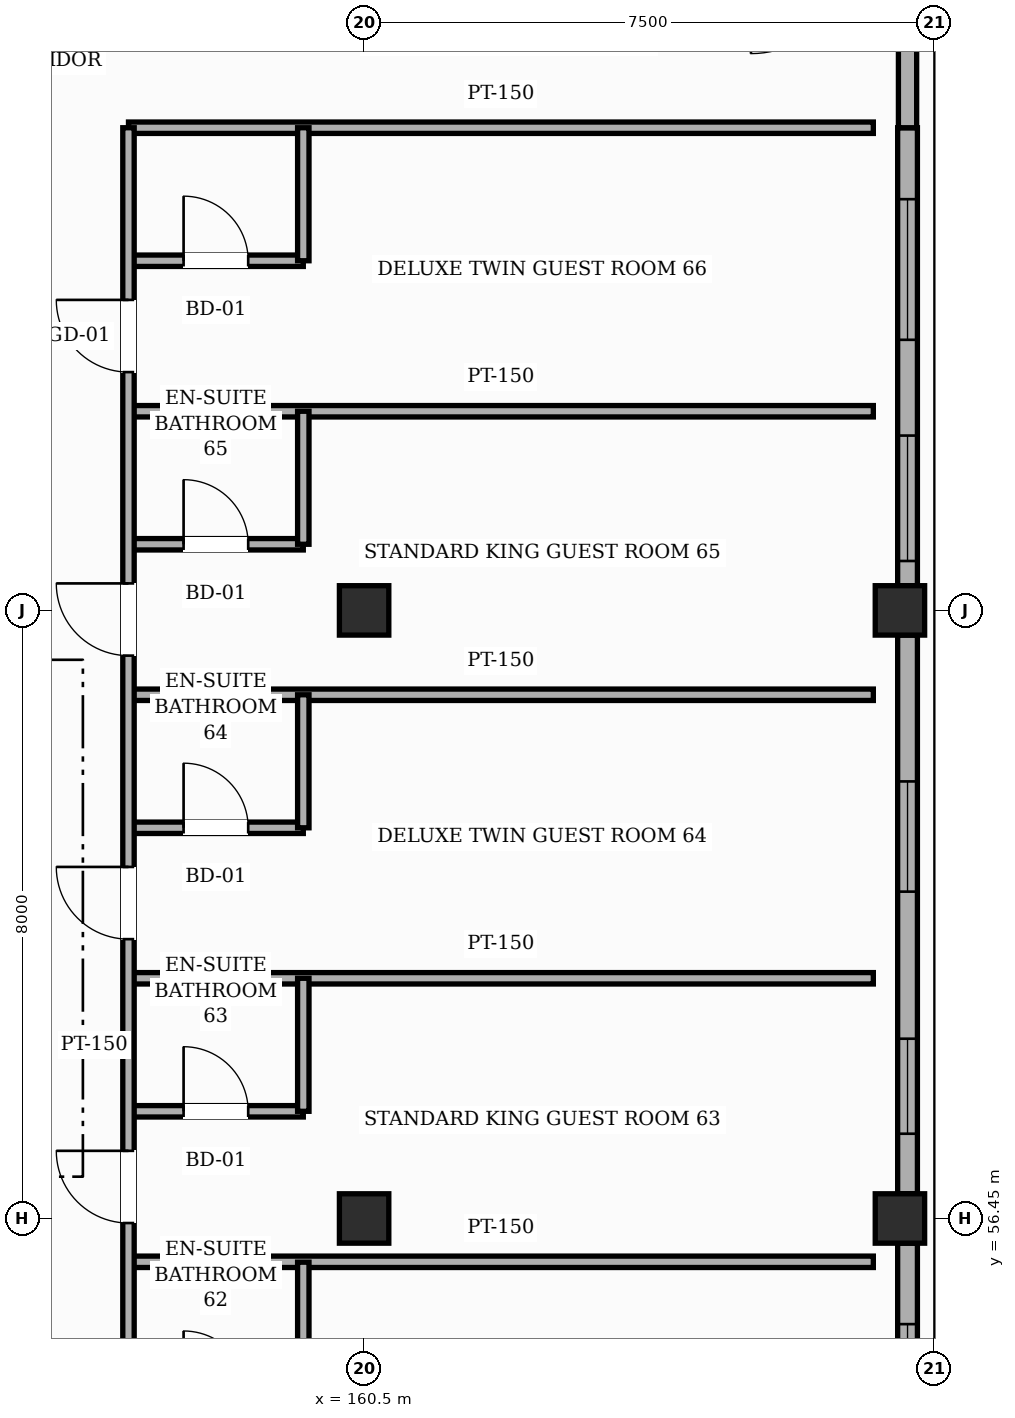
"""IFC4 building model, lengths in metres.
Left out: names, types, materials, properties, quantities, classifications, styles, units other than length and angle.
Written with IfcOpenShell. Run it as: python <this file> out.ifc"""

import sys

from ifc_helpers import new_model, si_unit, direction, frame, frame_2d, origin, origin_2d, place, context, subcontext, project, spatial, rectangle, hollow_rectangle, extrude, element, fill, save


model = new_model("IFC4")
c1 = context("Model", 3, precision=1e-05, world=origin(), true_north=direction((0.0, 1.0)))
c2 = subcontext(c1, "Body", "Model", "MODEL_VIEW")
j1 = project(units=[si_unit("LENGTHUNIT", "METRE"), si_unit("PLANEANGLEUNIT", "RADIAN")], contexts=[c1])
p1 = place(None, origin())
s1 = spatial("IfcSite", under=j1, at=p1, CompositionType="ELEMENT")
p2 = place(p1, origin())
s2 = spatial("IfcBuilding", under=s1, at=p2, CompositionType="ELEMENT")
p3 = place(p2, frame((0.0, 0.0, 19.8)))
s3 = spatial("IfcBuildingStorey", under=s2, at=p3, CompositionType="ELEMENT", Elevation=19.8)
for number, where, z_axis, x_axis in (
    (1, (160.5, 56.45, 0.0), (0.0, 0.0, 1.0), (1.0, 0.0, 0.0)),
    (2, (160.5, 64.45, 0.0), (0.0, 0.0, 1.0), (1.0, 0.0, 0.0)),
    (3, (167.55, 56.45, 0.0), (0.0, 0.0, 1.0), (1.0, 0.0, 0.0)),
    (4, (167.55, 64.45, 0.0), (0.0, 0.0, 1.0), (1.0, 0.0, 0.0)),
):
    element("IfcColumn", number, at=place(p3, frame(where, z_axis=z_axis, x_axis=x_axis)), inside=s3, PredefinedType="COLUMN", context=c2, shape_type="SweptSolid", body=[
        extrude(hollow_rectangle(XDim=0.65, YDim=0.65, WallThickness=0.025, InnerFilletRadius=0.025, OuterFilletRadius=0.05, at=origin_2d()), origin(), (0.0, 0.0, 1.0), 4.8),
    ])
p4 = place(p3, frame((167.65, 56.125, 0.0), z_axis=(0.0, 0.0, 1.0), x_axis=(0.0, -1.0, 0.0)))
e5 = element("IfcWall", 5, at=p4, inside=s3, PredefinedType="SOLIDWALL", context=c2, shape_type="SweptSolid", body=[
    extrude(rectangle(XDim=7.35, YDim=0.26, at=frame_2d((3.675, 0.0))), origin(), (0.0, 0.0, 1.0), 3.905),
])
p5 = place(p4, frame((4.74, 0.0, 0.85)))
e6 = element("IfcOpeningElement", 6, at=p5, cuts=e5, PredefinedType="OPENING", context=c2, shape_type="SweptSolid", body=[
    extrude(rectangle(XDim=1.85, YDim=1.95, at=frame_2d((0.925, 0.975))), frame((0.0, 0.14, 0.0), z_axis=(0.0, -1.0, 0.0), x_axis=(1.0, 0.0, 0.0)), (0.0, 0.0, 1.0), 0.28),
])
p6 = place(p4, frame((1.065, 0.0, 0.85)))
e7 = element("IfcOpeningElement", 7, at=p6, cuts=e5, PredefinedType="OPENING", context=c2, shape_type="SweptSolid", body=[
    extrude(rectangle(XDim=2.1, YDim=1.95, at=frame_2d((1.05, 0.975))), frame((0.0, 0.14, 0.0), z_axis=(0.0, -1.0, 0.0), x_axis=(1.0, 0.0, 0.0)), (0.0, 0.0, 1.0), 0.28),
])
p7 = place(p3, frame((167.65, 64.125, 0.0), z_axis=(0.0, 0.0, 1.0), x_axis=(0.0, -1.0, 0.0)))
e8 = element("IfcWall", 8, at=p7, inside=s3, PredefinedType="SOLIDWALL", context=c2, shape_type="SweptSolid", body=[
    extrude(rectangle(XDim=7.35, YDim=0.26, at=frame_2d((3.675, 0.0))), origin(), (0.0, 0.0, 1.0), 3.905),
])
p8 = place(p7, frame((5.31, 0.0, 0.85)))
e9 = element("IfcOpeningElement", 9, at=p8, cuts=e8, PredefinedType="OPENING", context=c2, shape_type="SweptSolid", body=[
    extrude(rectangle(XDim=1.25, YDim=1.35, at=frame_2d((0.625, 0.675))), frame((0.0, 0.14, 0.0), z_axis=(0.0, -1.0, 0.0), x_axis=(1.0, 0.0, 0.0)), (0.0, 0.0, 1.0), 0.28),
])
p9 = place(p7, frame((1.925, 0.0, 0.85)))
e10 = element("IfcOpeningElement", 10, at=p9, cuts=e8, PredefinedType="OPENING", context=c2, shape_type="SweptSolid", body=[
    extrude(rectangle(XDim=1.45, YDim=1.35, at=frame_2d((0.725, 0.675))), frame((0.0, 0.14, 0.0), z_axis=(0.0, -1.0, 0.0), x_axis=(1.0, 0.0, 0.0)), (0.0, 0.0, 1.0), 0.28),
])
p10 = place(p3, frame((167.65, 70.8, 0.0), z_axis=(0.0, 0.0, 1.0), x_axis=(0.0, -1.0, 0.0)))
e11 = element("IfcWall", 11, at=p10, inside=s3, PredefinedType="SOLIDWALL", context=c2, shape_type="SweptSolid", body=[
    extrude(rectangle(XDim=6.025, YDim=0.26, at=frame_2d((3.013, 0.0))), origin(), (0.0, 0.0, 1.0), 4.565),
])
p11 = place(p10, frame((4.05, 0.0, 0.85)))
e12 = element("IfcOpeningElement", 12, at=p11, cuts=e11, PredefinedType="OPENING", context=c2, shape_type="SweptSolid", body=[
    extrude(rectangle(XDim=1.65, YDim=1.35, at=frame_2d((0.825, 0.675))), frame((0.0, 0.14, 0.0), z_axis=(0.0, -1.0, 0.0), x_axis=(1.0, 0.0, 0.0)), (0.0, 0.0, 1.0), 0.28),
])
p12 = place(p10, frame((0.94, 0.0, 0.85)))
e13 = element("IfcOpeningElement", 13, at=p12, cuts=e11, PredefinedType="OPENING", context=c2, shape_type="SweptSolid", body=[
    extrude(rectangle(XDim=1.85, YDim=1.35, at=frame_2d((0.925, 0.675))), frame((0.0, 0.14, 0.0), z_axis=(0.0, -1.0, 0.0), x_axis=(1.0, 0.0, 0.0)), (0.0, 0.0, 1.0), 0.28),
])
p13 = place(p3, frame((167.65, 72.94, 0.0), z_axis=(0.0, 0.0, 1.0), x_axis=(0.0, -1.0, 0.0)))
e14 = element("IfcWall", 14, at=p13, inside=s3, PredefinedType="SOLIDWALL", context=c2, shape_type="SweptSolid", body=[
    extrude(rectangle(XDim=2.14, YDim=0.24, at=frame_2d((1.07, 0.0))), origin(), (0.0, 0.0, 1.0), 4.565),
])
p14 = place(p3, frame((157.4, 55.88, 0.0), z_axis=(0.0, 0.0, 1.0), x_axis=(1.0, 0.0, 0.0)))
e15 = element("IfcWall", 15, at=p14, inside=s3, PredefinedType="PARTITIONING", context=c2, shape_type="SweptSolid", body=[
    extrude(rectangle(XDim=9.8, YDim=0.15, at=frame_2d((4.9, 0.0))), origin(), (0.0, 0.0, 1.0), 4.565),
])
p15 = place(p3, frame((157.4, 57.86, 0.0), z_axis=(0.0, 0.0, 1.0), x_axis=(1.0, 0.0, 0.0)))
e16 = element("IfcWall", 16, at=p15, inside=s3, PredefinedType="PARTITIONING", context=c2, shape_type="SweptSolid", body=[
    extrude(rectangle(XDim=2.3, YDim=0.15, at=frame_2d((1.15, 0.0))), origin(), (0.0, 0.0, 1.0), 4.565),
])
p16 = place(p15, frame((0.725, 0.0, 0.0)))
e17 = element("IfcOpeningElement", 17, at=p16, cuts=e16, PredefinedType="OPENING", context=c2, shape_type="SweptSolid", body=[
    extrude(rectangle(XDim=0.85, YDim=2.1, at=frame_2d((0.425, 1.05))), frame((0.0, 0.085, 0.0), z_axis=(0.0, -1.0, 0.0), x_axis=(1.0, 0.0, 0.0)), (0.0, 0.0, 1.0), 0.17),
])
p17 = place(p3, frame((157.4, 59.61, 0.0), z_axis=(0.0, 0.0, 1.0), x_axis=(1.0, 0.0, 0.0)))
e18 = element("IfcWall", 18, at=p17, inside=s3, PredefinedType="PARTITIONING", context=c2, shape_type="SweptSolid", body=[
    extrude(rectangle(XDim=9.8, YDim=0.15, at=frame_2d((4.9, 0.0))), origin(), (0.0, 0.0, 1.0), 4.565),
])
p18 = place(p3, frame((157.4, 61.59, 0.0), z_axis=(0.0, 0.0, 1.0), x_axis=(1.0, 0.0, 0.0)))
e19 = element("IfcWall", 19, at=p18, inside=s3, PredefinedType="PARTITIONING", context=c2, shape_type="SweptSolid", body=[
    extrude(rectangle(XDim=2.3, YDim=0.15, at=frame_2d((1.15, 0.0))), origin(), (0.0, 0.0, 1.0), 4.565),
])
p19 = place(p18, frame((0.725, 0.0, 0.0)))
e20 = element("IfcOpeningElement", 20, at=p19, cuts=e19, PredefinedType="OPENING", context=c2, shape_type="SweptSolid", body=[
    extrude(rectangle(XDim=0.85, YDim=2.1, at=frame_2d((0.425, 1.05))), frame((0.0, 0.085, 0.0), z_axis=(0.0, -1.0, 0.0), x_axis=(1.0, 0.0, 0.0)), (0.0, 0.0, 1.0), 0.17),
])
p20 = place(p3, frame((157.4, 63.34, 0.0), z_axis=(0.0, 0.0, 1.0), x_axis=(1.0, 0.0, 0.0)))
e21 = element("IfcWall", 21, at=p20, inside=s3, PredefinedType="PARTITIONING", context=c2, shape_type="SweptSolid", body=[
    extrude(rectangle(XDim=9.8, YDim=0.15, at=frame_2d((4.9, 0.0))), origin(), (0.0, 0.0, 1.0), 4.565),
])
p21 = place(p3, frame((157.4, 65.32, 0.0), z_axis=(0.0, 0.0, 1.0), x_axis=(1.0, 0.0, 0.0)))
e22 = element("IfcWall", 22, at=p21, inside=s3, PredefinedType="PARTITIONING", context=c2, shape_type="SweptSolid", body=[
    extrude(rectangle(XDim=2.3, YDim=0.15, at=frame_2d((1.15, 0.0))), origin(), (0.0, 0.0, 1.0), 4.565),
])
p22 = place(p21, frame((0.725, 0.0, 0.0)))
e23 = element("IfcOpeningElement", 23, at=p22, cuts=e22, PredefinedType="OPENING", context=c2, shape_type="SweptSolid", body=[
    extrude(rectangle(XDim=0.85, YDim=2.1, at=frame_2d((0.425, 1.05))), frame((0.0, 0.085, 0.0), z_axis=(0.0, -1.0, 0.0), x_axis=(1.0, 0.0, 0.0)), (0.0, 0.0, 1.0), 0.17),
])
p23 = place(p3, frame((157.4, 67.07, 0.0), z_axis=(0.0, 0.0, 1.0), x_axis=(1.0, 0.0, 0.0)))
e24 = element("IfcWall", 24, at=p23, inside=s3, PredefinedType="PARTITIONING", context=c2, shape_type="SweptSolid", body=[
    extrude(rectangle(XDim=9.8, YDim=0.15, at=frame_2d((4.9, 0.0))), origin(), (0.0, 0.0, 1.0), 4.565),
])
p24 = place(p3, frame((157.4, 69.05, 0.0), z_axis=(0.0, 0.0, 1.0), x_axis=(1.0, 0.0, 0.0)))
e25 = element("IfcWall", 25, at=p24, inside=s3, PredefinedType="PARTITIONING", context=c2, shape_type="SweptSolid", body=[
    extrude(rectangle(XDim=2.3, YDim=0.15, at=frame_2d((1.15, 0.0))), origin(), (0.0, 0.0, 1.0), 4.565),
])
p25 = place(p24, frame((0.725, 0.0, 0.0)))
e26 = element("IfcOpeningElement", 26, at=p25, cuts=e25, PredefinedType="OPENING", context=c2, shape_type="SweptSolid", body=[
    extrude(rectangle(XDim=0.85, YDim=2.1, at=frame_2d((0.425, 1.05))), frame((0.0, 0.085, 0.0), z_axis=(0.0, -1.0, 0.0), x_axis=(1.0, 0.0, 0.0)), (0.0, 0.0, 1.0), 0.17),
])
p26 = place(p3, frame((157.4, 70.8, 0.0), z_axis=(0.0, 0.0, 1.0), x_axis=(1.0, 0.0, 0.0)))
e27 = element("IfcWall", 27, at=p26, inside=s3, PredefinedType="PARTITIONING", context=c2, shape_type="SweptSolid", body=[
    extrude(rectangle(XDim=9.8, YDim=0.15, at=frame_2d((4.9, 0.0))), origin(), (0.0, 0.0, 1.0), 4.565),
])
p27 = place(p3, frame((157.4, 22.3, 0.0), z_axis=(0.0, 0.0, 1.0), x_axis=(0.0, 1.0, 0.0)))
e28 = element("IfcWall", 28, at=p27, inside=s3, PredefinedType="PARTITIONING", context=c2, shape_type="SweptSolid", body=[
    extrude(rectangle(XDim=48.5, YDim=0.15, at=frame_2d((24.25, 0.0))), origin(), (0.0, 0.0, 1.0), 4.565),
])
p28 = place(p27, frame((0.515, 0.0, 0.0)))
e29 = element("IfcOpeningElement", 29, at=p28, cuts=e28, PredefinedType="OPENING", context=c2, shape_type="SweptSolid", body=[
    extrude(rectangle(XDim=0.95, YDim=2.15, at=frame_2d((0.475, 1.075))), frame((0.0, 0.085, 0.0), z_axis=(0.0, -1.0, 0.0), x_axis=(1.0, 0.0, 0.0)), (0.0, 0.0, 1.0), 0.17),
])
p29 = place(p27, frame((4.245, 0.0, 0.0)))
e30 = element("IfcOpeningElement", 30, at=p29, cuts=e28, PredefinedType="OPENING", context=c2, shape_type="SweptSolid", body=[
    extrude(rectangle(XDim=0.95, YDim=2.15, at=frame_2d((0.475, 1.075))), frame((0.0, 0.085, 0.0), z_axis=(0.0, -1.0, 0.0), x_axis=(1.0, 0.0, 0.0)), (0.0, 0.0, 1.0), 0.17),
])
p30 = place(p27, frame((7.975, 0.0, 0.0)))
e31 = element("IfcOpeningElement", 31, at=p30, cuts=e28, PredefinedType="OPENING", context=c2, shape_type="SweptSolid", body=[
    extrude(rectangle(XDim=0.95, YDim=2.15, at=frame_2d((0.475, 1.075))), frame((0.0, 0.085, 0.0), z_axis=(0.0, -1.0, 0.0), x_axis=(1.0, 0.0, 0.0)), (0.0, 0.0, 1.0), 0.17),
])
p31 = place(p27, frame((11.71, 0.0, 0.0)))
e32 = element("IfcOpeningElement", 32, at=p31, cuts=e28, PredefinedType="OPENING", context=c2, shape_type="SweptSolid", body=[
    extrude(rectangle(XDim=0.95, YDim=2.15, at=frame_2d((0.475, 1.075))), frame((0.0, 0.085, 0.0), z_axis=(0.0, -1.0, 0.0), x_axis=(1.0, 0.0, 0.0)), (0.0, 0.0, 1.0), 0.17),
])
p32 = place(p27, frame((15.44, 0.0, 0.0)))
e33 = element("IfcOpeningElement", 33, at=p32, cuts=e28, PredefinedType="OPENING", context=c2, shape_type="SweptSolid", body=[
    extrude(rectangle(XDim=0.95, YDim=2.15, at=frame_2d((0.475, 1.075))), frame((0.0, 0.085, 0.0), z_axis=(0.0, -1.0, 0.0), x_axis=(1.0, 0.0, 0.0)), (0.0, 0.0, 1.0), 0.17),
])
p33 = place(p27, frame((19.17, 0.0, 0.0)))
e34 = element("IfcOpeningElement", 34, at=p33, cuts=e28, PredefinedType="OPENING", context=c2, shape_type="SweptSolid", body=[
    extrude(rectangle(XDim=0.95, YDim=2.15, at=frame_2d((0.475, 1.075))), frame((0.0, 0.085, 0.0), z_axis=(0.0, -1.0, 0.0), x_axis=(1.0, 0.0, 0.0)), (0.0, 0.0, 1.0), 0.17),
])
p34 = place(p27, frame((22.9, 0.0, 0.0)))
e35 = element("IfcOpeningElement", 35, at=p34, cuts=e28, PredefinedType="OPENING", context=c2, shape_type="SweptSolid", body=[
    extrude(rectangle(XDim=0.95, YDim=2.15, at=frame_2d((0.475, 1.075))), frame((0.0, 0.085, 0.0), z_axis=(0.0, -1.0, 0.0), x_axis=(1.0, 0.0, 0.0)), (0.0, 0.0, 1.0), 0.17),
])
p35 = place(p27, frame((26.63, 0.0, 0.0)))
e36 = element("IfcOpeningElement", 36, at=p35, cuts=e28, PredefinedType="OPENING", context=c2, shape_type="SweptSolid", body=[
    extrude(rectangle(XDim=0.95, YDim=2.15, at=frame_2d((0.475, 1.075))), frame((0.0, 0.085, 0.0), z_axis=(0.0, -1.0, 0.0), x_axis=(1.0, 0.0, 0.0)), (0.0, 0.0, 1.0), 0.17),
])
p36 = place(p27, frame((30.36, 0.0, 0.0)))
e37 = element("IfcOpeningElement", 37, at=p36, cuts=e28, PredefinedType="OPENING", context=c2, shape_type="SweptSolid", body=[
    extrude(rectangle(XDim=0.95, YDim=2.15, at=frame_2d((0.475, 1.075))), frame((0.0, 0.085, 0.0), z_axis=(0.0, -1.0, 0.0), x_axis=(1.0, 0.0, 0.0)), (0.0, 0.0, 1.0), 0.17),
])
p37 = place(p27, frame((34.09, 0.0, 0.0)))
e38 = element("IfcOpeningElement", 38, at=p37, cuts=e28, PredefinedType="OPENING", context=c2, shape_type="SweptSolid", body=[
    extrude(rectangle(XDim=0.95, YDim=2.15, at=frame_2d((0.475, 1.075))), frame((0.0, 0.085, 0.0), z_axis=(0.0, -1.0, 0.0), x_axis=(1.0, 0.0, 0.0)), (0.0, 0.0, 1.0), 0.17),
])
p38 = place(p27, frame((37.825, 0.0, 0.0)))
e39 = element("IfcOpeningElement", 39, at=p38, cuts=e28, PredefinedType="OPENING", context=c2, shape_type="SweptSolid", body=[
    extrude(rectangle(XDim=0.95, YDim=2.15, at=frame_2d((0.475, 1.075))), frame((0.0, 0.085, 0.0), z_axis=(0.0, -1.0, 0.0), x_axis=(1.0, 0.0, 0.0)), (0.0, 0.0, 1.0), 0.17),
])
p39 = place(p27, frame((41.555, 0.0, 0.0)))
e40 = element("IfcOpeningElement", 40, at=p39, cuts=e28, PredefinedType="OPENING", context=c2, shape_type="SweptSolid", body=[
    extrude(rectangle(XDim=0.95, YDim=2.15, at=frame_2d((0.475, 1.075))), frame((0.0, 0.085, 0.0), z_axis=(0.0, -1.0, 0.0), x_axis=(1.0, 0.0, 0.0)), (0.0, 0.0, 1.0), 0.17),
])
p40 = place(p27, frame((45.285, 0.0, 0.0)))
e41 = element("IfcOpeningElement", 41, at=p40, cuts=e28, PredefinedType="OPENING", context=c2, shape_type="SweptSolid", body=[
    extrude(rectangle(XDim=0.95, YDim=2.15, at=frame_2d((0.475, 1.075))), frame((0.0, 0.085, 0.0), z_axis=(0.0, -1.0, 0.0), x_axis=(1.0, 0.0, 0.0)), (0.0, 0.0, 1.0), 0.17),
])
for number, where, z_axis, x_axis in (
    (42, (159.7, 54.125, 0.0), (0.0, 0.0, 1.0), (0.0, 1.0, 0.0)),
    (43, (159.7, 57.86, 0.0), (0.0, 0.0, 1.0), (0.0, 1.0, 0.0)),
    (44, (159.7, 61.59, 0.0), (0.0, 0.0, 1.0), (0.0, 1.0, 0.0)),
    (45, (159.7, 65.32, 0.0), (0.0, 0.0, 1.0), (0.0, 1.0, 0.0)),
    (46, (159.7, 69.05, 0.0), (0.0, 0.0, 1.0), (0.0, 1.0, 0.0)),
):
    element("IfcWall", number, at=place(p3, frame(where, z_axis=z_axis, x_axis=x_axis)), inside=s3, PredefinedType="PARTITIONING", context=c2, shape_type="SweptSolid", body=[
        extrude(rectangle(XDim=1.75, YDim=0.15, at=frame_2d((0.875, 0.0))), origin(), (0.0, 0.0, 1.0), 4.565),
    ])
p41 = place(p6, origin())
e47 = element("IfcWindow", 47, at=p41, inside=s3, PartitioningType="SINGLE_PANEL", PredefinedType="WINDOW", context=c2, shape_type="SweptSolid", body=[
    extrude(rectangle(XDim=2.1, YDim=1.95, at=frame_2d((1.05, 0.975))), frame((0.0, 0.03, 0.0), z_axis=(0.0, -1.0, 0.0), x_axis=(1.0, 0.0, 0.0)), (0.0, 0.0, 1.0), 0.06),
])
fill(e7, e47)
p42 = place(p8, origin())
e48 = element("IfcWindow", 48, at=p42, inside=s3, PartitioningType="SINGLE_PANEL", PredefinedType="WINDOW", context=c2, shape_type="SweptSolid", body=[
    extrude(rectangle(XDim=1.25, YDim=1.35, at=frame_2d((0.625, 0.675))), frame((0.0, 0.03, 0.0), z_axis=(0.0, -1.0, 0.0), x_axis=(1.0, 0.0, 0.0)), (0.0, 0.0, 1.0), 0.06),
])
fill(e9, e48)
p43 = place(p9, origin())
e49 = element("IfcWindow", 49, at=p43, inside=s3, PartitioningType="SINGLE_PANEL", PredefinedType="WINDOW", context=c2, shape_type="SweptSolid", body=[
    extrude(rectangle(XDim=1.45, YDim=1.35, at=frame_2d((0.725, 0.675))), frame((0.0, 0.03, 0.0), z_axis=(0.0, -1.0, 0.0), x_axis=(1.0, 0.0, 0.0)), (0.0, 0.0, 1.0), 0.06),
])
fill(e10, e49)
p44 = place(p11, origin())
e50 = element("IfcWindow", 50, at=p44, inside=s3, PartitioningType="SINGLE_PANEL", PredefinedType="WINDOW", context=c2, shape_type="SweptSolid", body=[
    extrude(rectangle(XDim=1.65, YDim=1.35, at=frame_2d((0.825, 0.675))), frame((0.0, 0.03, 0.0), z_axis=(0.0, -1.0, 0.0), x_axis=(1.0, 0.0, 0.0)), (0.0, 0.0, 1.0), 0.06),
])
fill(e12, e50)
p45 = place(p12, origin())
e51 = element("IfcWindow", 51, at=p45, inside=s3, PartitioningType="SINGLE_PANEL", PredefinedType="WINDOW", context=c2, shape_type="SweptSolid", body=[
    extrude(rectangle(XDim=1.85, YDim=1.35, at=frame_2d((0.925, 0.675))), frame((0.0, 0.03, 0.0), z_axis=(0.0, -1.0, 0.0), x_axis=(1.0, 0.0, 0.0)), (0.0, 0.0, 1.0), 0.06),
])
fill(e13, e51)
p46 = place(p37, origin())
e52 = element("IfcDoor", 52, at=p46, inside=s3, OperationType="SINGLE_SWING_RIGHT", PredefinedType="DOOR", context=c2, shape_type="SweptSolid", body=[
    extrude(rectangle(XDim=0.95, YDim=2.15, at=frame_2d((0.475, 1.075))), frame((0.0, 0.025, 0.0), z_axis=(0.0, -1.0, 0.0), x_axis=(1.0, 0.0, 0.0)), (0.0, 0.0, 1.0), 0.05),
])
fill(e38, e52)
p47 = place(p16, origin())
e53 = element("IfcDoor", 53, at=p47, inside=s3, OperationType="SINGLE_SWING_LEFT", PredefinedType="DOOR", context=c2, shape_type="SweptSolid", body=[
    extrude(rectangle(XDim=0.85, YDim=2.1, at=frame_2d((0.425, 1.05))), frame((0.0, 0.025, 0.0), z_axis=(0.0, -1.0, 0.0), x_axis=(1.0, 0.0, 0.0)), (0.0, 0.0, 1.0), 0.05),
])
fill(e17, e53)
p48 = place(p38, origin())
e54 = element("IfcDoor", 54, at=p48, inside=s3, OperationType="SINGLE_SWING_RIGHT", PredefinedType="DOOR", context=c2, shape_type="SweptSolid", body=[
    extrude(rectangle(XDim=0.95, YDim=2.15, at=frame_2d((0.475, 1.075))), frame((0.0, 0.025, 0.0), z_axis=(0.0, -1.0, 0.0), x_axis=(1.0, 0.0, 0.0)), (0.0, 0.0, 1.0), 0.05),
])
fill(e39, e54)
p49 = place(p19, origin())
e55 = element("IfcDoor", 55, at=p49, inside=s3, OperationType="SINGLE_SWING_LEFT", PredefinedType="DOOR", context=c2, shape_type="SweptSolid", body=[
    extrude(rectangle(XDim=0.85, YDim=2.1, at=frame_2d((0.425, 1.05))), frame((0.0, 0.025, 0.0), z_axis=(0.0, -1.0, 0.0), x_axis=(1.0, 0.0, 0.0)), (0.0, 0.0, 1.0), 0.05),
])
fill(e20, e55)
p50 = place(p39, origin())
e56 = element("IfcDoor", 56, at=p50, inside=s3, OperationType="SINGLE_SWING_RIGHT", PredefinedType="DOOR", context=c2, shape_type="SweptSolid", body=[
    extrude(rectangle(XDim=0.95, YDim=2.15, at=frame_2d((0.475, 1.075))), frame((0.0, 0.025, 0.0), z_axis=(0.0, -1.0, 0.0), x_axis=(1.0, 0.0, 0.0)), (0.0, 0.0, 1.0), 0.05),
])
fill(e40, e56)
p51 = place(p22, origin())
e57 = element("IfcDoor", 57, at=p51, inside=s3, OperationType="SINGLE_SWING_LEFT", PredefinedType="DOOR", context=c2, shape_type="SweptSolid", body=[
    extrude(rectangle(XDim=0.85, YDim=2.1, at=frame_2d((0.425, 1.05))), frame((0.0, 0.025, 0.0), z_axis=(0.0, -1.0, 0.0), x_axis=(1.0, 0.0, 0.0)), (0.0, 0.0, 1.0), 0.05),
])
fill(e23, e57)
p52 = place(p40, origin())
e58 = element("IfcDoor", 58, at=p52, inside=s3, OperationType="SINGLE_SWING_RIGHT", PredefinedType="DOOR", context=c2, shape_type="SweptSolid", body=[
    extrude(rectangle(XDim=0.95, YDim=2.15, at=frame_2d((0.475, 1.075))), frame((0.0, 0.025, 0.0), z_axis=(0.0, -1.0, 0.0), x_axis=(1.0, 0.0, 0.0)), (0.0, 0.0, 1.0), 0.05),
])
fill(e41, e58)
p53 = place(p25, origin())
e59 = element("IfcDoor", 59, at=p53, inside=s3, OperationType="SINGLE_SWING_LEFT", PredefinedType="DOOR", context=c2, shape_type="SweptSolid", body=[
    extrude(rectangle(XDim=0.85, YDim=2.1, at=frame_2d((0.425, 1.05))), frame((0.0, 0.025, 0.0), z_axis=(0.0, -1.0, 0.0), x_axis=(1.0, 0.0, 0.0)), (0.0, 0.0, 1.0), 0.05),
])
fill(e26, e59)
save(model, sys.argv[1])
